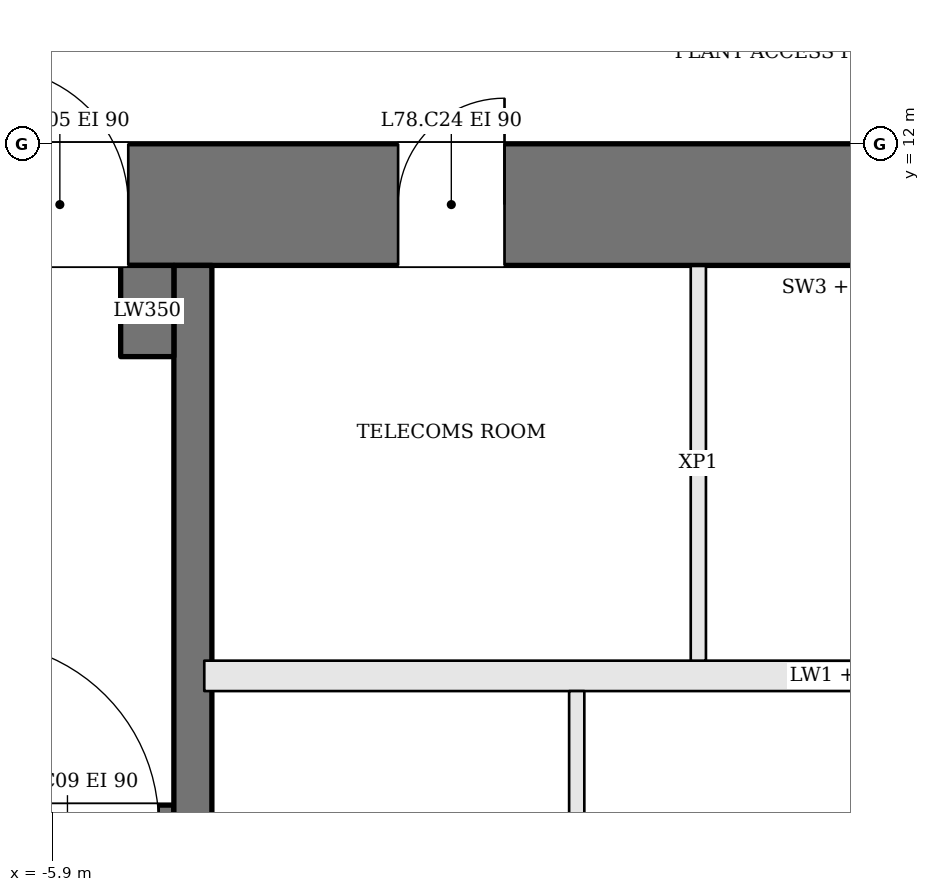
"""IFC4 building model, lengths in metres.
Left out: names, types, materials, properties, quantities, classifications, styles, units other than length and angle.
Written with IfcOpenShell. Run it as: python <this file> out.ifc"""

import sys

from ifc_helpers import new_model, si_unit, direction, frame, frame_2d, origin, place, context, subcontext, project, spatial, rectangle, extrude, element, fill, save


model = new_model("IFC4")
c1 = context("Model", 3, precision=1e-05, world=origin(), true_north=direction((0.0, 1.0)))
c2 = subcontext(c1, "Body", "Model", "MODEL_VIEW")
j1 = project(units=[si_unit("LENGTHUNIT", "METRE"), si_unit("PLANEANGLEUNIT", "RADIAN")], contexts=[c1])
p1 = place(None, origin())
s1 = spatial("IfcSite", under=j1, at=p1, CompositionType="ELEMENT")
p2 = place(p1, origin())
s2 = spatial("IfcBuilding", under=s1, at=p2, CompositionType="ELEMENT")
p3 = place(p2, frame((0.0, 0.0, 316.2)))
s3 = spatial("IfcBuildingStorey", under=s2, at=p3, CompositionType="ELEMENT", Elevation=316.2)
p4 = place(p3, frame((-13.0, 11.6, 0.0), z_axis=(0.0, 0.0, 1.0), x_axis=(1.0, 0.0, 0.0)))
e1 = element("IfcWall", 1, at=p4, inside=s3, PredefinedType="SHEAR", context=c2, shape_type="SweptSolid", body=[
    extrude(rectangle(XDim=26.0, YDim=0.8, at=frame_2d((13.0, 0.0))), origin(), (0.0, 0.0, 1.0), 4.0),
])
p5 = place(p4, frame((9.375, 0.0, 0.0)))
e2 = element("IfcOpeningElement", 2, at=p5, cuts=e1, PredefinedType="OPENING", context=c2, shape_type="SweptSolid", body=[
    extrude(rectangle(XDim=0.7, YDim=2.1, at=frame_2d((0.35, 1.05))), frame((0.0, 0.41, 0.0), z_axis=(0.0, -1.0, 0.0), x_axis=(1.0, 0.0, 0.0)), (0.0, 0.0, 1.0), 0.82),
])
p6 = place(p4, frame((12.375, 0.0, 0.0)))
e3 = element("IfcOpeningElement", 3, at=p6, cuts=e1, PredefinedType="OPENING", context=c2, shape_type="SweptSolid", body=[
    extrude(rectangle(XDim=1.2, YDim=2.1, at=frame_2d((0.6, 1.05))), frame((0.0, 0.41, 0.0), z_axis=(0.0, -1.0, 0.0), x_axis=(1.0, 0.0, 0.0)), (0.0, 0.0, 1.0), 0.82),
])
p7 = place(p4, frame((15.9, 0.0, 0.0)))
e4 = element("IfcOpeningElement", 4, at=p7, cuts=e1, PredefinedType="OPENING", context=c2, shape_type="SweptSolid", body=[
    extrude(rectangle(XDim=0.7, YDim=2.1, at=frame_2d((0.35, 1.05))), frame((0.0, 0.41, 0.0), z_axis=(0.0, -1.0, 0.0), x_axis=(1.0, 0.0, 0.0)), (0.0, 0.0, 1.0), 0.82),
])
p8 = place(p4, frame((6.7, 0.0, 0.0)))
e5 = element("IfcOpeningElement", 5, at=p8, cuts=e1, PredefinedType="OPENING", context=c2, shape_type="SweptSolid", body=[
    extrude(rectangle(XDim=0.9, YDim=2.1, at=frame_2d((0.45, 1.05))), frame((0.0, 0.41, 0.0), z_axis=(0.0, -1.0, 0.0), x_axis=(1.0, 0.0, 0.0)), (0.0, 0.0, 1.0), 0.82),
])
p9 = place(p3, frame((-12.2, 7.525, 0.0), z_axis=(0.0, 0.0, 1.0), x_axis=(1.0, 0.0, 0.0)))
e6 = element("IfcWall", 6, at=p9, inside=s3, PredefinedType="SOLIDWALL", context=c2, shape_type="SweptSolid", body=[
    extrude(rectangle(XDim=7.1, YDim=0.25, at=frame_2d((3.55, 0.0))), origin(), (0.0, 0.0, 1.0), 3.28),
])
p10 = place(p9, frame((5.8, 0.0, 0.0)))
e7 = element("IfcOpeningElement", 7, at=p10, cuts=e6, PredefinedType="OPENING", context=c2, shape_type="SweptSolid", body=[
    extrude(rectangle(XDim=1.2, YDim=2.1, at=frame_2d((0.6, 1.05))), frame((0.0, 0.135, 0.0), z_axis=(0.0, -1.0, 0.0), x_axis=(1.0, 0.0, 0.0)), (0.0, 0.0, 1.0), 0.27),
])
p11 = place(p3, frame((-4.975, -2.2, 0.0), z_axis=(0.0, 0.0, 1.0), x_axis=(0.0, 1.0, 0.0)))
e8 = element("IfcWall", 8, at=p11, inside=s3, PredefinedType="SOLIDWALL", context=c2, shape_type="SweptSolid", body=[
    extrude(rectangle(XDim=13.4, YDim=0.25, at=frame_2d((6.7, 0.0))), origin(), (0.0, 0.0, 1.0), 3.28),
])
p12 = place(p11, frame((5.25, 0.0, 0.0)))
e9 = element("IfcOpeningElement", 9, at=p12, cuts=e8, PredefinedType="OPENING", context=c2, shape_type="SweptSolid", body=[
    extrude(rectangle(XDim=1.2, YDim=2.1, at=frame_2d((0.6, 1.05))), frame((0.0, 0.135, 0.0), z_axis=(0.0, -1.0, 0.0), x_axis=(1.0, 0.0, 0.0)), (0.0, 0.0, 1.0), 0.27),
])
p13 = place(p3, frame((-5.275, 10.6, 0.0), z_axis=(0.0, 0.0, 1.0), x_axis=(0.0, 1.0, 0.0)))
e10 = element("IfcWall", 10, at=p13, inside=s3, PredefinedType="SOLIDWALL", context=c2, shape_type="SweptSolid", body=[
    extrude(rectangle(XDim=0.6, YDim=0.35, at=frame_2d((0.3, 0.0))), origin(), (0.0, 0.0, 1.0), 3.28),
])
p14 = place(p3, frame((-4.9, 8.5, 0.0), z_axis=(0.0, 0.0, 1.0), x_axis=(1.0, 0.0, 0.0)))
e11 = element("IfcWall", 11, at=p14, inside=s3, PredefinedType="SOLIDWALL", context=c2, shape_type="SweptSolid", body=[
    extrude(rectangle(XDim=9.8, YDim=0.2, at=frame_2d((4.9, 0.0))), origin(), (0.0, 0.0, 1.0), 3.28),
])
p15 = place(p3, frame((-2.45, 6.2, 0.0), z_axis=(0.0, 0.0, 1.0), x_axis=(0.0, 1.0, 0.0)))
e12 = element("IfcWall", 12, at=p15, inside=s3, PredefinedType="PARTITIONING", context=c2, shape_type="SweptSolid", body=[
    extrude(rectangle(XDim=2.2, YDim=0.1, at=frame_2d((1.1, 0.0))), origin(), (0.0, 0.0, 1.0), 3.28),
])
p16 = place(p3, frame((-1.65, 8.6, 0.0), z_axis=(0.0, 0.0, 1.0), x_axis=(0.0, 1.0, 0.0)))
e13 = element("IfcWall", 13, at=p16, inside=s3, PredefinedType="PARTITIONING", context=c2, shape_type="SweptSolid", body=[
    extrude(rectangle(XDim=2.6, YDim=0.1, at=frame_2d((1.3, 0.0))), origin(), (0.0, 0.0, 1.0), 3.28),
])
p17 = place(p5, origin())
e14 = element("IfcDoor", 14, at=p17, inside=s3, OperationType="SINGLE_SWING_RIGHT", PredefinedType="DOOR", context=c2, shape_type="SweptSolid", body=[
    extrude(rectangle(XDim=0.7, YDim=2.1, at=frame_2d((0.35, 1.05))), frame((0.0, 0.025, 0.0), z_axis=(0.0, -1.0, 0.0), x_axis=(1.0, 0.0, 0.0)), (0.0, 0.0, 1.0), 0.05),
])
fill(e2, e14)
p18 = place(p8, origin())
e15 = element("IfcDoor", 15, at=p18, inside=s3, OperationType="SINGLE_SWING_LEFT", PredefinedType="DOOR", context=c2, shape_type="SweptSolid", body=[
    extrude(rectangle(XDim=0.9, YDim=2.1, at=frame_2d((0.45, 1.05))), frame((0.0, 0.025, 0.0), z_axis=(0.0, -1.0, 0.0), x_axis=(1.0, 0.0, 0.0)), (0.0, 0.0, 1.0), 0.05),
])
fill(e5, e15)
save(model, sys.argv[1])
